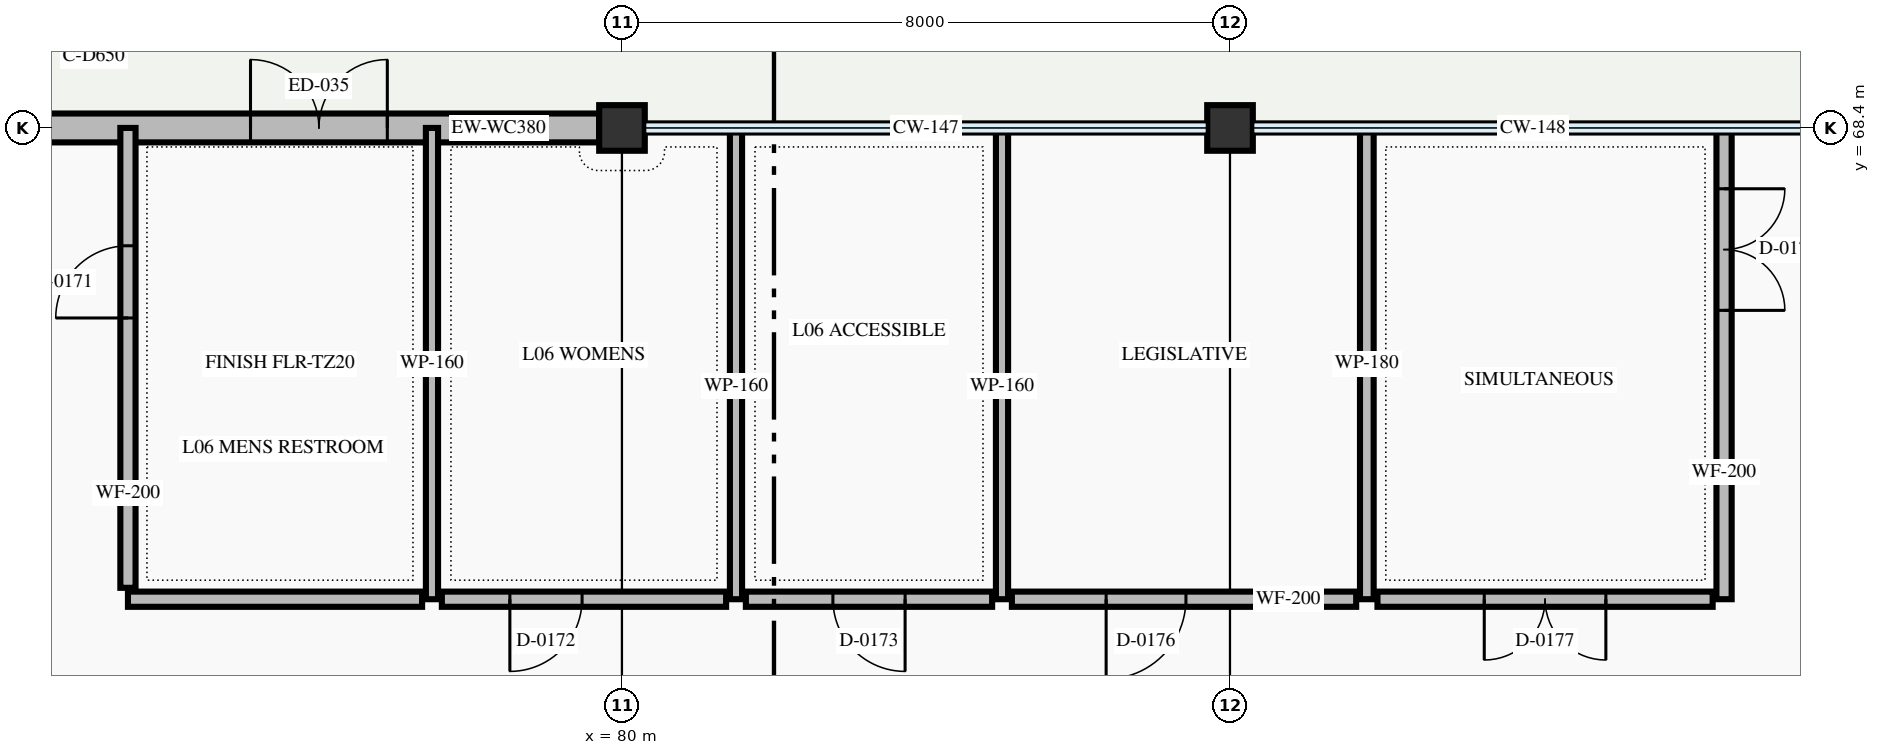
"""IFC4 building model, lengths in metres.
Left out: names, types, materials, properties, quantities, classifications, styles, units other than length and angle.
Written with IfcOpenShell. Run it as: python <this file> out.ifc"""

import sys

from ifc_helpers import new_model, si_unit, direction, frame, frame_2d, origin, origin_2d, place, context, subcontext, project, spatial, rectangle, extrude, element, fill, save


model = new_model("IFC4")
c1 = context("Model", 3, precision=1e-05, world=origin(), true_north=direction((0.0, 1.0)))
c2 = subcontext(c1, "Body", "Model", "MODEL_VIEW")
j1 = project(units=[si_unit("LENGTHUNIT", "METRE"), si_unit("PLANEANGLEUNIT", "RADIAN")], contexts=[c1])
p1 = place(None, origin())
s1 = spatial("IfcSite", under=j1, at=p1, CompositionType="ELEMENT")
p2 = place(p1, origin())
s2 = spatial("IfcBuilding", under=s1, at=p2, CompositionType="ELEMENT")
p3 = place(p2, frame((0.0, 0.0, 23.7)))
s3 = spatial("IfcBuildingStorey", under=s2, at=p3, CompositionType="ELEMENT", Elevation=23.7)
for number, where, z_axis, x_axis in (
    (1, (80.0, 68.4, 0.0), (0.0, 0.0, 1.0), (1.0, 0.0, 0.0)),
    (2, (88.0, 68.4, 0.0), (0.0, 0.0, 1.0), (1.0, 0.0, 0.0)),
):
    element("IfcColumn", number, at=place(p3, frame(where, z_axis=z_axis, x_axis=x_axis)), inside=s3, PredefinedType="COLUMN", context=c2, shape_type="SweptSolid", body=[
        extrude(rectangle(XDim=0.6, YDim=0.6, at=origin_2d()), origin(), (0.0, 0.0, 1.0), 4.8),
    ])
p4 = place(p3, frame((72.325, 68.4, 0.0), z_axis=(0.0, 0.0, 1.0), x_axis=(1.0, 0.0, 0.0)))
e3 = element("IfcWall", 3, at=p4, inside=s3, PredefinedType="STANDARD", context=c2, shape_type="SweptSolid", body=[
    extrude(rectangle(XDim=7.375, YDim=0.38, at=frame_2d((3.688, 0.0))), origin(), (0.0, 0.0, 1.0), 3.93),
])
p5 = place(p4, frame((2.788, 0.0, 0.0)))
e4 = element("IfcOpeningElement", 4, at=p5, cuts=e3, PredefinedType="OPENING", context=c2, shape_type="SweptSolid", body=[
    extrude(rectangle(XDim=1.8, YDim=2.4, at=frame_2d((0.9, 1.2))), frame((0.0, 0.2, 0.0), z_axis=(0.0, -1.0, 0.0), x_axis=(1.0, 0.0, 0.0)), (0.0, 0.0, 1.0), 0.4),
])
p6 = place(p3, frame((77.5, 68.4, 0.0), z_axis=(0.0, 0.0, 1.0), x_axis=(0.0, -1.0, 0.0)))
e5 = element("IfcWall", 5, at=p6, inside=s3, PredefinedType="PARTITIONING", context=c2, shape_type="SweptSolid", body=[
    extrude(rectangle(XDim=6.2, YDim=0.16, at=frame_2d((3.1, 0.0))), origin(), (0.0, 0.0, 1.0), 4.58),
])
p7 = place(p3, frame((77.37, 62.2, 0.0), z_axis=(0.0, 0.0, 1.0), x_axis=(-1.0, 0.0, 0.0)))
e6 = element("IfcWall", 6, at=p7, inside=s3, PredefinedType="STANDARD", context=c2, shape_type="SweptSolid", body=[
    extrude(rectangle(XDim=3.87, YDim=0.2, at=frame_2d((1.935, 0.0))), origin(), (0.0, 0.0, 1.0), 4.58),
])
p8 = place(p3, frame((73.5, 62.35, 0.0), z_axis=(0.0, 0.0, 1.0), x_axis=(0.0, 1.0, 0.0)))
e7 = element("IfcWall", 7, at=p8, inside=s3, PredefinedType="STANDARD", context=c2, shape_type="SweptSolid", body=[
    extrude(rectangle(XDim=6.05, YDim=0.2, at=frame_2d((3.025, 0.0))), origin(), (0.0, 0.0, 1.0), 4.58),
])
p9 = place(p8, frame((3.55, 0.0, 0.0)))
e8 = element("IfcOpeningElement", 8, at=p9, cuts=e7, PredefinedType="OPENING", context=c2, shape_type="SweptSolid", body=[
    extrude(rectangle(XDim=0.95, YDim=2.15, at=frame_2d((0.475, 1.075))), frame((0.0, 0.11, 0.0), z_axis=(0.0, -1.0, 0.0), x_axis=(1.0, 0.0, 0.0)), (0.0, 0.0, 1.0), 0.22),
])
p10 = place(p3, frame((81.5, 68.4, 0.0), z_axis=(0.0, 0.0, 1.0), x_axis=(0.0, -1.0, 0.0)))
e9 = element("IfcWall", 9, at=p10, inside=s3, PredefinedType="PARTITIONING", context=c2, shape_type="SweptSolid", body=[
    extrude(rectangle(XDim=6.2, YDim=0.16, at=frame_2d((3.1, 0.0))), origin(), (0.0, 0.0, 1.0), 4.58),
])
p11 = place(p3, frame((81.37, 62.2, 0.0), z_axis=(0.0, 0.0, 1.0), x_axis=(-1.0, 0.0, 0.0)))
e10 = element("IfcWall", 10, at=p11, inside=s3, PredefinedType="STANDARD", context=c2, shape_type="SweptSolid", body=[
    extrude(rectangle(XDim=3.74, YDim=0.2, at=frame_2d((1.87, 0.0))), origin(), (0.0, 0.0, 1.0), 4.58),
])
p12 = place(p11, frame((1.895, 0.0, 0.0)))
e11 = element("IfcOpeningElement", 11, at=p12, cuts=e10, PredefinedType="OPENING", context=c2, shape_type="SweptSolid", body=[
    extrude(rectangle(XDim=0.95, YDim=2.15, at=frame_2d((0.475, 1.075))), frame((0.0, 0.11, 0.0), z_axis=(0.0, -1.0, 0.0), x_axis=(1.0, 0.0, 0.0)), (0.0, 0.0, 1.0), 0.22),
])
p13 = place(p3, frame((85.0, 68.4, 0.0), z_axis=(0.0, 0.0, 1.0), x_axis=(0.0, -1.0, 0.0)))
e12 = element("IfcWall", 12, at=p13, inside=s3, PredefinedType="PARTITIONING", context=c2, shape_type="SweptSolid", body=[
    extrude(rectangle(XDim=6.2, YDim=0.16, at=frame_2d((3.1, 0.0))), origin(), (0.0, 0.0, 1.0), 4.58),
])
p14 = place(p3, frame((84.87, 62.2, 0.0), z_axis=(0.0, 0.0, 1.0), x_axis=(-1.0, 0.0, 0.0)))
e13 = element("IfcWall", 13, at=p14, inside=s3, PredefinedType="STANDARD", context=c2, shape_type="SweptSolid", body=[
    extrude(rectangle(XDim=3.24, YDim=0.2, at=frame_2d((1.62, 0.0))), origin(), (0.0, 0.0, 1.0), 4.58),
])
p15 = place(p14, frame((1.145, 0.0, 0.0)))
e14 = element("IfcOpeningElement", 14, at=p15, cuts=e13, PredefinedType="OPENING", context=c2, shape_type="SweptSolid", body=[
    extrude(rectangle(XDim=0.95, YDim=2.15, at=frame_2d((0.475, 1.075))), frame((0.0, 0.11, 0.0), z_axis=(0.0, -1.0, 0.0), x_axis=(1.0, 0.0, 0.0)), (0.0, 0.0, 1.0), 0.22),
])
p16 = place(p3, frame((89.8, 62.2, 0.0), z_axis=(0.0, 0.0, 1.0), x_axis=(0.0, 1.0, 0.0)))
e15 = element("IfcWall", 15, at=p16, inside=s3, PredefinedType="PARTITIONING", context=c2, shape_type="SweptSolid", body=[
    extrude(rectangle(XDim=6.2, YDim=0.18, at=frame_2d((3.1, 0.0))), origin(), (0.0, 0.0, 1.0), 4.58),
])
p17 = place(p3, frame((94.5, 68.4, 0.0), z_axis=(0.0, 0.0, 1.0), x_axis=(0.0, -1.0, 0.0)))
e16 = element("IfcWall", 16, at=p17, inside=s3, PredefinedType="STANDARD", context=c2, shape_type="SweptSolid", body=[
    extrude(rectangle(XDim=6.2, YDim=0.2, at=frame_2d((3.1, 0.0))), origin(), (0.0, 0.0, 1.0), 4.58),
])
p18 = place(p17, frame((0.8, 0.0, 0.0)))
e17 = element("IfcOpeningElement", 17, at=p18, cuts=e16, PredefinedType="OPENING", context=c2, shape_type="SweptSolid", body=[
    extrude(rectangle(XDim=1.6, YDim=2.3, at=frame_2d((0.8, 1.15))), frame((0.0, 0.11, 0.0), z_axis=(0.0, -1.0, 0.0), x_axis=(1.0, 0.0, 0.0)), (0.0, 0.0, 1.0), 0.22),
])
p19 = place(p3, frame((94.35, 62.2, 0.0), z_axis=(0.0, 0.0, 1.0), x_axis=(-1.0, 0.0, 0.0)))
e18 = element("IfcWall", 18, at=p19, inside=s3, PredefinedType="STANDARD", context=c2, shape_type="SweptSolid", body=[
    extrude(rectangle(XDim=4.41, YDim=0.2, at=frame_2d((2.205, 0.0))), origin(), (0.0, 0.0, 1.0), 4.58),
])
p20 = place(p19, frame((1.405, 0.0, 0.0)))
e19 = element("IfcOpeningElement", 19, at=p20, cuts=e18, PredefinedType="OPENING", context=c2, shape_type="SweptSolid", body=[
    extrude(rectangle(XDim=1.6, YDim=2.3, at=frame_2d((0.8, 1.15))), frame((0.0, 0.11, 0.0), z_axis=(0.0, -1.0, 0.0), x_axis=(1.0, 0.0, 0.0)), (0.0, 0.0, 1.0), 0.22),
])
p21 = place(p3, frame((89.66, 62.2, 0.0), z_axis=(0.0, 0.0, 1.0), x_axis=(-1.0, 0.0, 0.0)))
e20 = element("IfcWall", 20, at=p21, inside=s3, PredefinedType="STANDARD", context=c2, shape_type="SweptSolid", body=[
    extrude(rectangle(XDim=4.53, YDim=0.2, at=frame_2d((2.265, 0.0))), origin(), (0.0, 0.0, 1.0), 4.58),
])
p22 = place(p21, frame((2.24, 0.0, 0.0)))
e21 = element("IfcOpeningElement", 21, at=p22, cuts=e20, PredefinedType="OPENING", context=c2, shape_type="SweptSolid", body=[
    extrude(rectangle(XDim=1.05, YDim=2.15, at=frame_2d((0.525, 1.075))), frame((0.0, 0.11, 0.0), z_axis=(0.0, -1.0, 0.0), x_axis=(1.0, 0.0, 0.0)), (0.0, 0.0, 1.0), 0.22),
])
p23 = place(p5, origin())
e22 = element("IfcDoor", 22, at=p23, inside=s3, OperationType="DOUBLE_DOOR_SINGLE_SWING", PredefinedType="DOOR", context=c2, shape_type="SweptSolid", body=[
    extrude(rectangle(XDim=1.8, YDim=2.4, at=frame_2d((0.9, 1.2))), frame((0.0, 0.025, 0.0), z_axis=(0.0, -1.0, 0.0), x_axis=(1.0, 0.0, 0.0)), (0.0, 0.0, 1.0), 0.05),
])
fill(e4, e22)
p24 = place(p9, origin())
e23 = element("IfcDoor", 23, at=p24, inside=s3, OperationType="SINGLE_SWING_LEFT", PredefinedType="DOOR", context=c2, shape_type="SweptSolid", body=[
    extrude(rectangle(XDim=0.95, YDim=2.15, at=frame_2d((0.475, 1.075))), frame((0.0, 0.025, 0.0), z_axis=(0.0, -1.0, 0.0), x_axis=(1.0, 0.0, 0.0)), (0.0, 0.0, 1.0), 0.05),
])
fill(e8, e23)
p25 = place(p12, origin())
e24 = element("IfcDoor", 24, at=p25, inside=s3, OperationType="SINGLE_SWING_RIGHT", PredefinedType="DOOR", context=c2, shape_type="SweptSolid", body=[
    extrude(rectangle(XDim=0.95, YDim=2.15, at=frame_2d((0.475, 1.075))), frame((0.0, 0.025, 0.0), z_axis=(0.0, -1.0, 0.0), x_axis=(1.0, 0.0, 0.0)), (0.0, 0.0, 1.0), 0.05),
])
fill(e11, e24)
p26 = place(p15, origin())
e25 = element("IfcDoor", 25, at=p26, inside=s3, OperationType="SINGLE_SWING_LEFT", PredefinedType="DOOR", context=c2, shape_type="SweptSolid", body=[
    extrude(rectangle(XDim=0.95, YDim=2.15, at=frame_2d((0.475, 1.075))), frame((0.0, 0.025, 0.0), z_axis=(0.0, -1.0, 0.0), x_axis=(1.0, 0.0, 0.0)), (0.0, 0.0, 1.0), 0.05),
])
fill(e14, e25)
p27 = place(p18, origin())
e26 = element("IfcDoor", 26, at=p27, inside=s3, OperationType="DOUBLE_DOOR_SINGLE_SWING", PredefinedType="DOOR", context=c2, shape_type="SweptSolid", body=[
    extrude(rectangle(XDim=1.6, YDim=2.3, at=frame_2d((0.8, 1.15))), frame((0.0, 0.025, 0.0), z_axis=(0.0, -1.0, 0.0), x_axis=(1.0, 0.0, 0.0)), (0.0, 0.0, 1.0), 0.05),
])
fill(e17, e26)
p28 = place(p22, origin())
e27 = element("IfcDoor", 27, at=p28, inside=s3, OperationType="SINGLE_SWING_RIGHT", PredefinedType="DOOR", context=c2, shape_type="SweptSolid", body=[
    extrude(rectangle(XDim=1.05, YDim=2.15, at=frame_2d((0.525, 1.075))), frame((0.0, 0.025, 0.0), z_axis=(0.0, -1.0, 0.0), x_axis=(1.0, 0.0, 0.0)), (0.0, 0.0, 1.0), 0.05),
])
fill(e21, e27)
p29 = place(p20, origin())
e28 = element("IfcDoor", 28, at=p29, inside=s3, OperationType="DOUBLE_DOOR_SINGLE_SWING", PredefinedType="DOOR", context=c2, shape_type="SweptSolid", body=[
    extrude(rectangle(XDim=1.6, YDim=2.3, at=frame_2d((0.8, 1.15))), frame((0.0, 0.025, 0.0), z_axis=(0.0, -1.0, 0.0), x_axis=(1.0, 0.0, 0.0)), (0.0, 0.0, 1.0), 0.05),
])
fill(e19, e28)
save(model, sys.argv[1])
